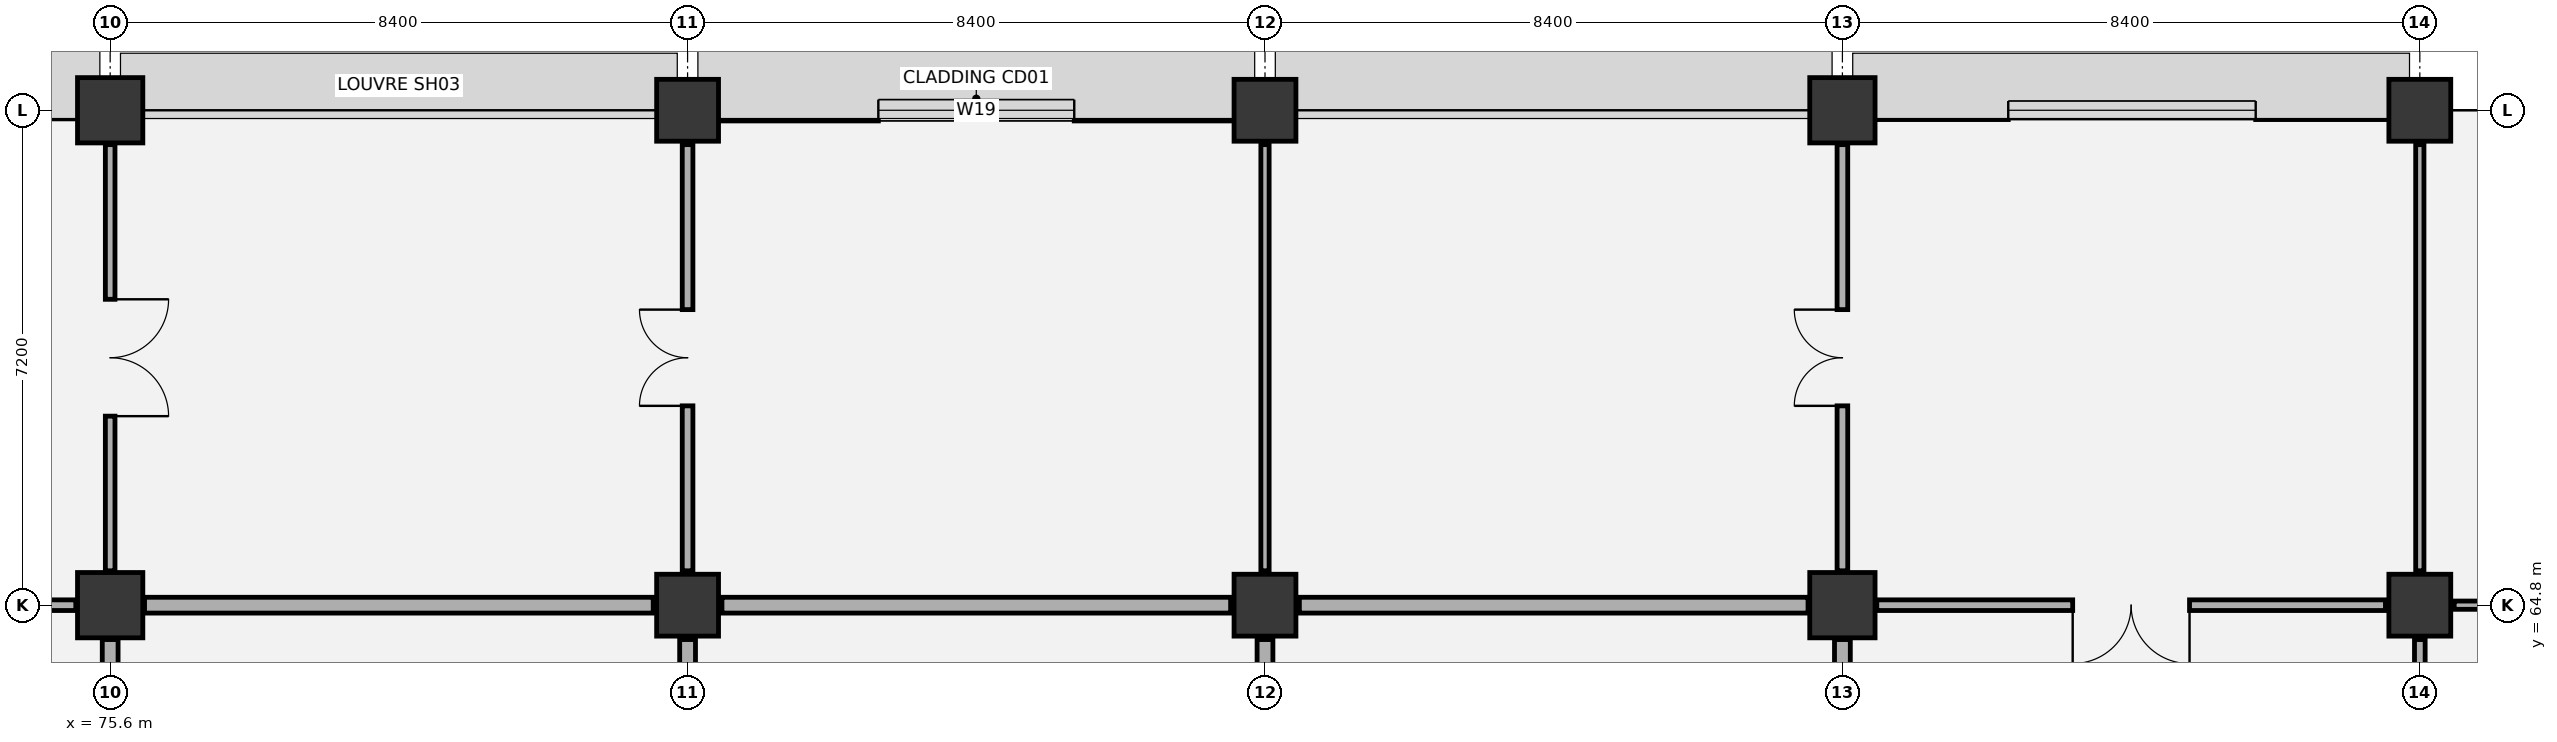
"""IFC4 building model, lengths in metres.
Left out: names, types, materials, properties, quantities, classifications, styles, units other than length and angle.
Written with IfcOpenShell. Run it as: python <this file> out.ifc"""

import sys

from ifc_helpers import new_model, si_unit, direction, frame, frame_2d, origin, origin_2d, place, context, subcontext, project, spatial, rectangle, extrude, element, fill, save


model = new_model("IFC4")
c1 = context("Model", 3, precision=1e-05, world=origin(), true_north=direction((0.0, 1.0)))
c2 = subcontext(c1, "Body", "Model", "MODEL_VIEW")
j1 = project(units=[si_unit("LENGTHUNIT", "METRE"), si_unit("PLANEANGLEUNIT", "RADIAN")], contexts=[c1])
p1 = place(None, origin())
s1 = spatial("IfcSite", under=j1, at=p1, CompositionType="ELEMENT")
p2 = place(p1, origin())
s2 = spatial("IfcBuilding", under=s1, at=p2, CompositionType="ELEMENT")
p3 = place(p2, frame((0.0, 0.0, 6.0)))
s3 = spatial("IfcBuildingStorey", under=s2, at=p3, CompositionType="ELEMENT", Elevation=6.0)
for number, where, z_axis, x_axis in (
    (1, (75.6, 64.8, 0.0), (0.0, 0.0, 1.0), (1.0, 0.0, 0.0)),
    (2, (75.6, 72.0, 0.0), (0.0, 0.0, 1.0), (1.0, 0.0, 0.0)),
):
    element("IfcColumn", number, at=place(p3, frame(where, z_axis=z_axis, x_axis=x_axis)), inside=s3, PredefinedType="COLUMN", context=c2, shape_type="SweptSolid", body=[
        extrude(rectangle(XDim=0.95, YDim=0.95, at=origin_2d()), origin(), (0.0, 0.0, 1.0), 5.4),
    ])
for number, where, z_axis, x_axis in (
    (3, (84.0, 64.8, 0.0), (0.0, 0.0, 1.0), (1.0, 0.0, 0.0)),
    (4, (84.0, 72.0, 0.0), (0.0, 0.0, 1.0), (1.0, 0.0, 0.0)),
    (5, (92.4, 64.8, 0.0), (0.0, 0.0, 1.0), (1.0, 0.0, 0.0)),
    (6, (92.4, 72.0, 0.0), (0.0, 0.0, 1.0), (1.0, 0.0, 0.0)),
):
    element("IfcColumn", number, at=place(p3, frame(where, z_axis=z_axis, x_axis=x_axis)), inside=s3, PredefinedType="COLUMN", context=c2, shape_type="SweptSolid", body=[
        extrude(rectangle(XDim=0.9, YDim=0.9, at=origin_2d()), origin(), (0.0, 0.0, 1.0), 5.4),
    ])
for number, where, z_axis, x_axis in (
    (7, (100.8, 64.8, 0.0), (0.0, 0.0, 1.0), (1.0, 0.0, 0.0)),
    (8, (100.8, 72.0, 0.0), (0.0, 0.0, 1.0), (1.0, 0.0, 0.0)),
):
    element("IfcColumn", number, at=place(p3, frame(where, z_axis=z_axis, x_axis=x_axis)), inside=s3, PredefinedType="COLUMN", context=c2, shape_type="SweptSolid", body=[
        extrude(rectangle(XDim=0.95, YDim=0.95, at=origin_2d()), origin(), (0.0, 0.0, 1.0), 5.4),
    ])
for number, where, z_axis, x_axis in (
    (9, (109.2, 64.8, 0.0), (0.0, 0.0, 1.0), (1.0, 0.0, 0.0)),
    (10, (109.2, 72.0, 0.0), (0.0, 0.0, 1.0), (1.0, 0.0, 0.0)),
):
    element("IfcColumn", number, at=place(p3, frame(where, z_axis=z_axis, x_axis=x_axis)), inside=s3, PredefinedType="COLUMN", context=c2, shape_type="SweptSolid", body=[
        extrude(rectangle(XDim=0.9, YDim=0.9, at=origin_2d()), origin(), (0.0, 0.0, 1.0), 5.4),
    ])
p4 = place(p3, frame((67.65, 72.0, 0.0), z_axis=(0.0, 0.0, 1.0), x_axis=(1.0, 0.0, 0.0)))
e11 = element("IfcWall", 11, at=p4, inside=s3, PredefinedType="SOLIDWALL", context=c2, shape_type="SweptSolid", body=[
    extrude(rectangle(XDim=7.475, YDim=0.25, at=frame_2d((3.738, 0.0))), origin(), (0.0, 0.0, 1.0), 4.42),
])
p5 = place(p4, frame((2.238, 0.0, 0.9)))
e12 = element("IfcOpeningElement", 12, at=p5, cuts=e11, PredefinedType="OPENING", context=c2, shape_type="SweptSolid", body=[
    extrude(rectangle(XDim=3.0, YDim=2.1, at=frame_2d((1.5, 1.05))), frame((0.0, 0.135, 0.0), z_axis=(0.0, -1.0, 0.0), x_axis=(1.0, 0.0, 0.0)), (0.0, 0.0, 1.0), 0.27),
])
p6 = place(p3, frame((84.45, 72.0, 0.0), z_axis=(0.0, 0.0, 1.0), x_axis=(1.0, 0.0, 0.0)))
e13 = element("IfcWall", 13, at=p6, inside=s3, PredefinedType="SOLIDWALL", context=c2, shape_type="SweptSolid", body=[
    extrude(rectangle(XDim=7.5, YDim=0.31, at=frame_2d((3.75, 0.0))), origin(), (0.0, 0.0, 1.0), 4.42),
])
p7 = place(p6, frame((2.325, 0.0, 0.9)))
e14 = element("IfcOpeningElement", 14, at=p7, cuts=e13, PredefinedType="OPENING", context=c2, shape_type="SweptSolid", body=[
    extrude(rectangle(XDim=2.85, YDim=1.95, at=frame_2d((1.425, 0.975))), frame((0.0, 0.165, 0.0), z_axis=(0.0, -1.0, 0.0), x_axis=(1.0, 0.0, 0.0)), (0.0, 0.0, 1.0), 0.33),
])
p8 = place(p3, frame((101.275, 72.0, 0.0), z_axis=(0.0, 0.0, 1.0), x_axis=(1.0, 0.0, 0.0)))
e15 = element("IfcWall", 15, at=p8, inside=s3, PredefinedType="SOLIDWALL", context=c2, shape_type="SweptSolid", body=[
    extrude(rectangle(XDim=7.475, YDim=0.27, at=frame_2d((3.738, 0.0))), origin(), (0.0, 0.0, 1.0), 4.42),
])
p9 = place(p8, frame((1.938, 0.0, 0.9)))
e16 = element("IfcOpeningElement", 16, at=p9, cuts=e15, PredefinedType="OPENING", context=c2, shape_type="SweptSolid", body=[
    extrude(rectangle(XDim=3.6, YDim=2.4, at=frame_2d((1.8, 1.2))), frame((0.0, 0.145, 0.0), z_axis=(0.0, -1.0, 0.0), x_axis=(1.0, 0.0, 0.0)), (0.0, 0.0, 1.0), 0.29),
])
p10 = place(p3, frame((75.6, 58.1, 0.0), z_axis=(0.0, 0.0, 1.0), x_axis=(0.0, 1.0, 0.0)))
e17 = element("IfcWall", 17, at=p10, inside=s3, PredefinedType="PARTITIONING", context=c2, shape_type="SweptSolid", body=[
    extrude(rectangle(XDim=6.2, YDim=0.23, at=frame_2d((3.1, 0.0))), origin(), (0.0, 0.0, 1.0), 4.67),
])
p11 = place(p3, frame((67.7, 64.8, 0.0), z_axis=(0.0, 0.0, 1.0), x_axis=(1.0, 0.0, 0.0)))
e18 = element("IfcWall", 18, at=p11, inside=s3, PredefinedType="PARTITIONING", context=c2, shape_type="SweptSolid", body=[
    extrude(rectangle(XDim=7.4, YDim=0.155, at=frame_2d((3.7, 0.0))), origin(), (0.0, 0.0, 1.0), 4.27),
])
p12 = place(p11, frame((3.0, 0.0, 0.0)))
e19 = element("IfcOpeningElement", 19, at=p12, cuts=e18, PredefinedType="OPENING", context=c2, shape_type="SweptSolid", body=[
    extrude(rectangle(XDim=1.4, YDim=2.15, at=frame_2d((0.7, 1.075))), frame((0.0, 0.087, 0.0), z_axis=(0.0, -1.0, 0.0), x_axis=(1.0, 0.0, 0.0)), (0.0, 0.0, 1.0), 0.175),
])
p13 = place(p3, frame((75.6, 65.3, 0.0), z_axis=(0.0, 0.0, 1.0), x_axis=(0.0, 1.0, 0.0)))
e20 = element("IfcWall", 20, at=p13, inside=s3, PredefinedType="PARTITIONING", context=c2, shape_type="SweptSolid", body=[
    extrude(rectangle(XDim=6.2, YDim=0.14, at=frame_2d((3.1, 0.0))), origin(), (0.0, 0.0, 1.0), 4.32),
])
p14 = place(p13, frame((2.25, 0.0, 0.0)))
e21 = element("IfcOpeningElement", 21, at=p14, cuts=e20, PredefinedType="OPENING", context=c2, shape_type="SweptSolid", body=[
    extrude(rectangle(XDim=1.7, YDim=2.25, at=frame_2d((0.85, 1.125))), frame((0.0, 0.08, 0.0), z_axis=(0.0, -1.0, 0.0), x_axis=(1.0, 0.0, 0.0)), (0.0, 0.0, 1.0), 0.16),
])
p15 = place(p3, frame((84.0, 58.1, 0.0), z_axis=(0.0, 0.0, 1.0), x_axis=(0.0, 1.0, 0.0)))
e22 = element("IfcWall", 22, at=p15, inside=s3, PredefinedType="PARTITIONING", context=c2, shape_type="SweptSolid", body=[
    extrude(rectangle(XDim=6.2, YDim=0.23, at=frame_2d((3.1, 0.0))), origin(), (0.0, 0.0, 1.0), 4.32),
])
p16 = place(p15, frame((0.25, 0.0, 0.0)))
e23 = element("IfcOpeningElement", 23, at=p16, cuts=e22, PredefinedType="OPENING", context=c2, shape_type="SweptSolid", body=[
    extrude(rectangle(XDim=1.05, YDim=2.15, at=frame_2d((0.525, 1.075))), frame((0.0, 0.125, 0.0), z_axis=(0.0, -1.0, 0.0), x_axis=(1.0, 0.0, 0.0)), (0.0, 0.0, 1.0), 0.25),
])
p17 = place(p3, frame((76.1, 64.8, 0.0), z_axis=(0.0, 0.0, 1.0), x_axis=(1.0, 0.0, 0.0)))
e24 = element("IfcWall", 24, at=p17, inside=s3, PredefinedType="PARTITIONING", context=c2, shape_type="SweptSolid", body=[
    extrude(rectangle(XDim=7.4, YDim=0.23, at=frame_2d((3.7, 0.0))), origin(), (0.0, 0.0, 1.0), 4.27),
])
p18 = place(p3, frame((84.0, 65.3, 0.0), z_axis=(0.0, 0.0, 1.0), x_axis=(0.0, 1.0, 0.0)))
e25 = element("IfcWall", 25, at=p18, inside=s3, PredefinedType="PARTITIONING", context=c2, shape_type="SweptSolid", body=[
    extrude(rectangle(XDim=6.2, YDim=0.155, at=frame_2d((3.1, 0.0))), origin(), (0.0, 0.0, 1.0), 4.78),
])
p19 = place(p18, frame((2.4, 0.0, 0.0)))
e26 = element("IfcOpeningElement", 26, at=p19, cuts=e25, PredefinedType="OPENING", context=c2, shape_type="SweptSolid", body=[
    extrude(rectangle(XDim=1.4, YDim=2.15, at=frame_2d((0.7, 1.075))), frame((0.0, 0.087, 0.0), z_axis=(0.0, -1.0, 0.0), x_axis=(1.0, 0.0, 0.0)), (0.0, 0.0, 1.0), 0.175),
])
p20 = place(p3, frame((92.4, 58.1, 0.0), z_axis=(0.0, 0.0, 1.0), x_axis=(0.0, 1.0, 0.0)))
e27 = element("IfcWall", 27, at=p20, inside=s3, PredefinedType="PARTITIONING", context=c2, shape_type="SweptSolid", body=[
    extrude(rectangle(XDim=6.2, YDim=0.23, at=frame_2d((3.1, 0.0))), origin(), (0.0, 0.0, 1.0), 4.78),
])
p21 = place(p20, frame((0.25, 0.0, 0.0)))
e28 = element("IfcOpeningElement", 28, at=p21, cuts=e27, PredefinedType="OPENING", context=c2, shape_type="SweptSolid", body=[
    extrude(rectangle(XDim=1.05, YDim=2.15, at=frame_2d((0.525, 1.075))), frame((0.0, 0.125, 0.0), z_axis=(0.0, -1.0, 0.0), x_axis=(1.0, 0.0, 0.0)), (0.0, 0.0, 1.0), 0.25),
])
p22 = place(p3, frame((84.5, 64.8, 0.0), z_axis=(0.0, 0.0, 1.0), x_axis=(1.0, 0.0, 0.0)))
e29 = element("IfcWall", 29, at=p22, inside=s3, PredefinedType="PARTITIONING", context=c2, shape_type="SweptSolid", body=[
    extrude(rectangle(XDim=7.4, YDim=0.23, at=frame_2d((3.7, 0.0))), origin(), (0.0, 0.0, 1.0), 4.27),
])
p23 = place(p3, frame((92.4, 65.3, 0.0), z_axis=(0.0, 0.0, 1.0), x_axis=(0.0, 1.0, 0.0)))
e30 = element("IfcWall", 30, at=p23, inside=s3, PredefinedType="PARTITIONING", context=c2, shape_type="SweptSolid", body=[
    extrude(rectangle(XDim=6.2, YDim=0.12, at=frame_2d((3.1, 0.0))), origin(), (0.0, 0.0, 1.0), 4.32),
])
p24 = place(p3, frame((100.8, 58.1, 0.0), z_axis=(0.0, 0.0, 1.0), x_axis=(0.0, 1.0, 0.0)))
e31 = element("IfcWall", 31, at=p24, inside=s3, PredefinedType="PARTITIONING", context=c2, shape_type="SweptSolid", body=[
    extrude(rectangle(XDim=6.2, YDim=0.23, at=frame_2d((3.1, 0.0))), origin(), (0.0, 0.0, 1.0), 4.32),
])
p25 = place(p3, frame((92.9, 64.8, 0.0), z_axis=(0.0, 0.0, 1.0), x_axis=(1.0, 0.0, 0.0)))
e32 = element("IfcWall", 32, at=p25, inside=s3, PredefinedType="PARTITIONING", context=c2, shape_type="SweptSolid", body=[
    extrude(rectangle(XDim=7.4, YDim=0.23, at=frame_2d((3.7, 0.0))), origin(), (0.0, 0.0, 1.0), 4.27),
])
p26 = place(p3, frame((100.8, 65.3, 0.0), z_axis=(0.0, 0.0, 1.0), x_axis=(0.0, 1.0, 0.0)))
e33 = element("IfcWall", 33, at=p26, inside=s3, PredefinedType="PARTITIONING", context=c2, shape_type="SweptSolid", body=[
    extrude(rectangle(XDim=6.2, YDim=0.155, at=frame_2d((3.1, 0.0))), origin(), (0.0, 0.0, 1.0), 4.57),
])
p27 = place(p26, frame((2.4, 0.0, 0.0)))
e34 = element("IfcOpeningElement", 34, at=p27, cuts=e33, PredefinedType="OPENING", context=c2, shape_type="SweptSolid", body=[
    extrude(rectangle(XDim=1.4, YDim=2.15, at=frame_2d((0.7, 1.075))), frame((0.0, 0.087, 0.0), z_axis=(0.0, -1.0, 0.0), x_axis=(1.0, 0.0, 0.0)), (0.0, 0.0, 1.0), 0.175),
])
p28 = place(p3, frame((109.2, 58.1, 0.0), z_axis=(0.0, 0.0, 1.0), x_axis=(0.0, 1.0, 0.0)))
e35 = element("IfcWall", 35, at=p28, inside=s3, PredefinedType="PARTITIONING", context=c2, shape_type="SweptSolid", body=[
    extrude(rectangle(XDim=6.2, YDim=0.155, at=frame_2d((3.1, 0.0))), origin(), (0.0, 0.0, 1.0), 4.57),
])
p29 = place(p28, frame((2.4, 0.0, 0.0)))
e36 = element("IfcOpeningElement", 36, at=p29, cuts=e35, PredefinedType="OPENING", context=c2, shape_type="SweptSolid", body=[
    extrude(rectangle(XDim=1.4, YDim=2.15, at=frame_2d((0.7, 1.075))), frame((0.0, 0.087, 0.0), z_axis=(0.0, -1.0, 0.0), x_axis=(1.0, 0.0, 0.0)), (0.0, 0.0, 1.0), 0.175),
])
p30 = place(p3, frame((101.3, 64.8, 0.0), z_axis=(0.0, 0.0, 1.0), x_axis=(1.0, 0.0, 0.0)))
e37 = element("IfcWall", 37, at=p30, inside=s3, PredefinedType="PARTITIONING", context=c2, shape_type="SweptSolid", body=[
    extrude(rectangle(XDim=7.4, YDim=0.155, at=frame_2d((3.7, 0.0))), origin(), (0.0, 0.0, 1.0), 4.27),
])
p31 = place(p30, frame((2.85, 0.0, 0.0)))
e38 = element("IfcOpeningElement", 38, at=p31, cuts=e37, PredefinedType="OPENING", context=c2, shape_type="SweptSolid", body=[
    extrude(rectangle(XDim=1.7, YDim=2.25, at=frame_2d((0.85, 1.125))), frame((0.0, 0.087, 0.0), z_axis=(0.0, -1.0, 0.0), x_axis=(1.0, 0.0, 0.0)), (0.0, 0.0, 1.0), 0.175),
])
p32 = place(p3, frame((109.2, 65.3, 0.0), z_axis=(0.0, 0.0, 1.0), x_axis=(0.0, 1.0, 0.0)))
e39 = element("IfcWall", 39, at=p32, inside=s3, PredefinedType="PARTITIONING", context=c2, shape_type="SweptSolid", body=[
    extrude(rectangle(XDim=6.2, YDim=0.12, at=frame_2d((3.1, 0.0))), origin(), (0.0, 0.0, 1.0), 4.32),
])
p33 = place(p3, frame((109.7, 64.8, 0.0), z_axis=(0.0, 0.0, 1.0), x_axis=(1.0, 0.0, 0.0)))
e40 = element("IfcWall", 40, at=p33, inside=s3, PredefinedType="PARTITIONING", context=c2, shape_type="SweptSolid", body=[
    extrude(rectangle(XDim=7.4, YDim=0.12, at=frame_2d((3.7, 0.0))), origin(), (0.0, 0.0, 1.0), 4.27),
])
p34 = place(p7, origin())
e41 = element("IfcWindow", 41, at=p34, inside=s3, PartitioningType="SINGLE_PANEL", PredefinedType="WINDOW", context=c2, shape_type="SweptSolid", body=[
    extrude(rectangle(XDim=2.85, YDim=1.95, at=frame_2d((1.425, 0.975))), frame((0.0, 0.03, 0.0), z_axis=(0.0, -1.0, 0.0), x_axis=(1.0, 0.0, 0.0)), (0.0, 0.0, 1.0), 0.06),
])
fill(e14, e41)
p35 = place(p9, origin())
e42 = element("IfcWindow", 42, at=p35, inside=s3, PartitioningType="SINGLE_PANEL", PredefinedType="WINDOW", context=c2, shape_type="SweptSolid", body=[
    extrude(rectangle(XDim=3.6, YDim=2.4, at=frame_2d((1.8, 1.2))), frame((0.0, 0.03, 0.0), z_axis=(0.0, -1.0, 0.0), x_axis=(1.0, 0.0, 0.0)), (0.0, 0.0, 1.0), 0.06),
])
fill(e16, e42)
p36 = place(p14, frame((1.7, 0.0, 0.0), z_axis=(0.0, 0.0, 1.0), x_axis=(-1.0, 0.0, 0.0)))
e43 = element("IfcDoor", 43, at=p36, inside=s3, OperationType="DOUBLE_DOOR_SINGLE_SWING", PredefinedType="DOOR", context=c2, shape_type="SweptSolid", body=[
    extrude(rectangle(XDim=1.7, YDim=2.25, at=frame_2d((0.85, 1.125))), frame((0.0, 0.025, 0.0), z_axis=(0.0, -1.0, 0.0), x_axis=(1.0, 0.0, 0.0)), (0.0, 0.0, 1.0), 0.05),
])
fill(e21, e43)
p37 = place(p19, origin())
e44 = element("IfcDoor", 44, at=p37, inside=s3, OperationType="DOUBLE_DOOR_SINGLE_SWING", PredefinedType="DOOR", context=c2, shape_type="SweptSolid", body=[
    extrude(rectangle(XDim=1.4, YDim=2.15, at=frame_2d((0.7, 1.075))), frame((0.0, 0.025, 0.0), z_axis=(0.0, -1.0, 0.0), x_axis=(1.0, 0.0, 0.0)), (0.0, 0.0, 1.0), 0.05),
])
fill(e26, e44)
p38 = place(p27, origin())
e45 = element("IfcDoor", 45, at=p38, inside=s3, OperationType="DOUBLE_DOOR_SINGLE_SWING", PredefinedType="DOOR", context=c2, shape_type="SweptSolid", body=[
    extrude(rectangle(XDim=1.4, YDim=2.15, at=frame_2d((0.7, 1.075))), frame((0.0, 0.025, 0.0), z_axis=(0.0, -1.0, 0.0), x_axis=(1.0, 0.0, 0.0)), (0.0, 0.0, 1.0), 0.05),
])
fill(e34, e45)
p39 = place(p31, frame((1.7, 0.0, 0.0), z_axis=(0.0, 0.0, 1.0), x_axis=(-1.0, 0.0, 0.0)))
e46 = element("IfcDoor", 46, at=p39, inside=s3, OperationType="DOUBLE_DOOR_SINGLE_SWING", PredefinedType="DOOR", context=c2, shape_type="SweptSolid", body=[
    extrude(rectangle(XDim=1.7, YDim=2.25, at=frame_2d((0.85, 1.125))), frame((0.0, 0.025, 0.0), z_axis=(0.0, -1.0, 0.0), x_axis=(1.0, 0.0, 0.0)), (0.0, 0.0, 1.0), 0.05),
])
fill(e38, e46)
save(model, sys.argv[1])
